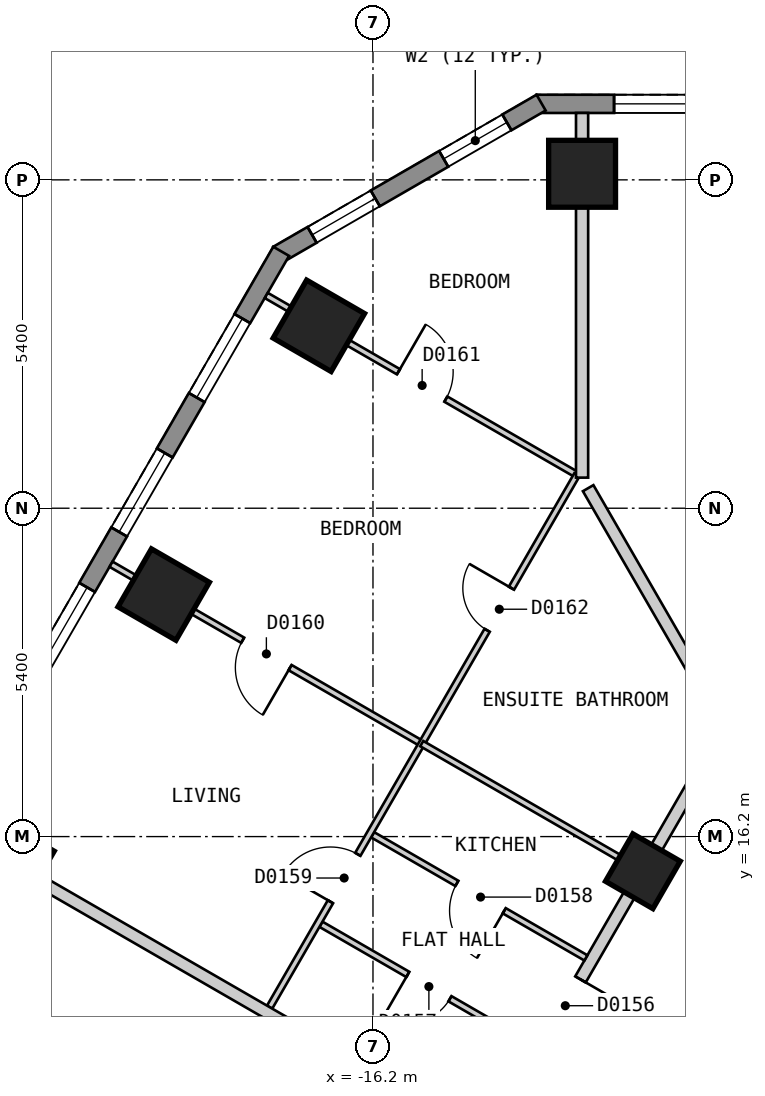
"""IFC4 building model, lengths in metres.
Left out: names, types, materials, properties, quantities, classifications, styles, units other than length and angle.
Written with IfcOpenShell. Run it as: python <this file> out.ifc"""

import sys

from ifc_helpers import new_model, si_unit, direction, frame, frame_2d, origin, origin_2d, place, context, subcontext, project, spatial, polyline, rectangle, outline, extrude, element, fill, save


model = new_model("IFC4")
c1 = context("Model", 3, precision=1e-05, world=origin(), true_north=direction((0.0, 1.0)))
c2 = subcontext(c1, "Body", "Model", "MODEL_VIEW")
j1 = project(units=[si_unit("LENGTHUNIT", "METRE"), si_unit("PLANEANGLEUNIT", "RADIAN")], contexts=[c1])
p1 = place(None, origin())
s1 = spatial("IfcSite", under=j1, at=p1, CompositionType="ELEMENT")
p2 = place(p1, origin())
s2 = spatial("IfcBuilding", under=s1, at=p2, CompositionType="ELEMENT")
p3 = place(p2, frame((0.0, 0.0, 29.4)))
s3 = spatial("IfcBuildingStorey", under=s2, at=p3, CompositionType="ELEMENT", Elevation=29.4)
for number, where, z_axis, x_axis in (
    (1, (-12.761, 27.1, 0.0), (0.0, 0.0, 1.0), (-1.0, 0.0, 0.0)),
    (2, (-17.09, 24.6, 0.0), (0.0, 0.0, 1.0), (-0.5, -0.866, 0.0)),
    (3, (-19.642, 20.18, 0.0), (0.0, 0.0, 1.0), (-0.5, -0.866, 0.0)),
    (4, (-22.194, 15.759, 0.0), (0.0, 0.0, 1.0), (-0.5, -0.866, 0.0)),
):
    element("IfcColumn", number, at=place(p3, frame(where, z_axis=z_axis, x_axis=x_axis)), inside=s3, PredefinedType="COLUMN", context=c2, shape_type="SweptSolid", body=[
        extrude(rectangle(XDim=1.1, YDim=1.1, at=origin_2d()), origin(), (0.0, 0.0, 1.0), 3.0),
    ])
p4 = place(p3, frame((-11.761, 15.63, 0.0), z_axis=(0.0, 0.0, 1.0), x_axis=(-0.499984884929, -0.866034130299, 0.0)))
e5 = element("IfcColumn", 5, at=p4, inside=s3, PredefinedType="COLUMN", context=c2, shape_type="SweptSolid", body=[
    extrude(rectangle(XDim=0.9, YDim=0.9, at=origin_2d()), origin(), (0.0, 0.0, 1.0), 3.0),
])
p5 = place(p3, frame((13.51, 28.25, 0.0), z_axis=(0.0, 0.0, 1.0), x_axis=(-1.0, 0.0, 0.0)))
e6 = element("IfcWall", 6, at=p5, inside=s3, PredefinedType="SOLIDWALL", context=c2, shape_type="SweptSolid", body=[
    extrude(outline(polyline([(0.0, -0.15), (27.02, -0.15), (26.94, 0.15), (0.08, 0.15), (0.0, -0.15)])), origin(), (0.0, 0.0, 1.0), 2.7),
])
p6 = place(p5, frame((1.277, 0.0, 0.15)))
e7 = element("IfcOpeningElement", 7, at=p6, cuts=e6, PredefinedType="OPENING", context=c2, shape_type="SweptSolid", body=[
    extrude(rectangle(XDim=1.5, YDim=2.1, at=frame_2d((0.75, 1.05))), frame((0.0, 0.16, 0.0), z_axis=(0.0, -1.0, 0.0), x_axis=(1.0, 0.0, 0.0)), (0.0, 0.0, 1.0), 0.32),
])
p7 = place(p5, frame((3.829, 0.0, 0.15)))
e8 = element("IfcOpeningElement", 8, at=p7, cuts=e6, PredefinedType="OPENING", context=c2, shape_type="SweptSolid", body=[
    extrude(rectangle(XDim=1.5, YDim=2.1, at=frame_2d((0.75, 1.05))), frame((0.0, 0.16, 0.0), z_axis=(0.0, -1.0, 0.0), x_axis=(1.0, 0.0, 0.0)), (0.0, 0.0, 1.0), 0.32),
])
p8 = place(p5, frame((6.381, 0.0, 0.15)))
e9 = element("IfcOpeningElement", 9, at=p8, cuts=e6, PredefinedType="OPENING", context=c2, shape_type="SweptSolid", body=[
    extrude(rectangle(XDim=1.5, YDim=2.1, at=frame_2d((0.75, 1.05))), frame((0.0, 0.16, 0.0), z_axis=(0.0, -1.0, 0.0), x_axis=(1.0, 0.0, 0.0)), (0.0, 0.0, 1.0), 0.32),
])
p9 = place(p5, frame((8.933, 0.0, 0.15)))
e10 = element("IfcOpeningElement", 10, at=p9, cuts=e6, PredefinedType="OPENING", context=c2, shape_type="SweptSolid", body=[
    extrude(rectangle(XDim=1.5, YDim=2.1, at=frame_2d((0.75, 1.05))), frame((0.0, 0.16, 0.0), z_axis=(0.0, -1.0, 0.0), x_axis=(1.0, 0.0, 0.0)), (0.0, 0.0, 1.0), 0.32),
])
p10 = place(p5, frame((11.485, 0.0, 0.15)))
e11 = element("IfcOpeningElement", 11, at=p10, cuts=e6, PredefinedType="OPENING", context=c2, shape_type="SweptSolid", body=[
    extrude(rectangle(XDim=1.5, YDim=2.1, at=frame_2d((0.75, 1.05))), frame((0.0, 0.16, 0.0), z_axis=(0.0, -1.0, 0.0), x_axis=(1.0, 0.0, 0.0)), (0.0, 0.0, 1.0), 0.32),
])
p11 = place(p5, frame((14.037, 0.0, 0.15)))
e12 = element("IfcOpeningElement", 12, at=p11, cuts=e6, PredefinedType="OPENING", context=c2, shape_type="SweptSolid", body=[
    extrude(rectangle(XDim=1.5, YDim=2.1, at=frame_2d((0.75, 1.05))), frame((0.0, 0.16, 0.0), z_axis=(0.0, -1.0, 0.0), x_axis=(1.0, 0.0, 0.0)), (0.0, 0.0, 1.0), 0.32),
])
p12 = place(p5, frame((16.589, 0.0, 0.15)))
e13 = element("IfcOpeningElement", 13, at=p12, cuts=e6, PredefinedType="OPENING", context=c2, shape_type="SweptSolid", body=[
    extrude(rectangle(XDim=1.5, YDim=2.1, at=frame_2d((0.75, 1.05))), frame((0.0, 0.16, 0.0), z_axis=(0.0, -1.0, 0.0), x_axis=(1.0, 0.0, 0.0)), (0.0, 0.0, 1.0), 0.32),
])
p13 = place(p5, frame((19.141, 0.0, 0.15)))
e14 = element("IfcOpeningElement", 14, at=p13, cuts=e6, PredefinedType="OPENING", context=c2, shape_type="SweptSolid", body=[
    extrude(rectangle(XDim=1.5, YDim=2.1, at=frame_2d((0.75, 1.05))), frame((0.0, 0.16, 0.0), z_axis=(0.0, -1.0, 0.0), x_axis=(1.0, 0.0, 0.0)), (0.0, 0.0, 1.0), 0.32),
])
p14 = place(p5, frame((21.693, 0.0, 0.15)))
e15 = element("IfcOpeningElement", 15, at=p14, cuts=e6, PredefinedType="OPENING", context=c2, shape_type="SweptSolid", body=[
    extrude(rectangle(XDim=1.5, YDim=2.1, at=frame_2d((0.75, 1.05))), frame((0.0, 0.16, 0.0), z_axis=(0.0, -1.0, 0.0), x_axis=(1.0, 0.0, 0.0)), (0.0, 0.0, 1.0), 0.32),
])
p15 = place(p5, frame((24.245, 0.0, 0.15)))
e16 = element("IfcOpeningElement", 16, at=p15, cuts=e6, PredefinedType="OPENING", context=c2, shape_type="SweptSolid", body=[
    extrude(rectangle(XDim=1.5, YDim=2.1, at=frame_2d((0.75, 1.05))), frame((0.0, 0.16, 0.0), z_axis=(0.0, -1.0, 0.0), x_axis=(1.0, 0.0, 0.0)), (0.0, 0.0, 1.0), 0.32),
])
p16 = place(p3, frame((-13.435, 28.27, 0.0), z_axis=(0.0, 0.0, 1.0), x_axis=(-0.866010750942, -0.50002537861, 0.0)))
e17 = element("IfcWall", 17, at=p16, inside=s3, PredefinedType="SOLIDWALL", context=c2, shape_type="SweptSolid", body=[
    extrude(outline(polyline([(0.0, -0.15), (5.0, -0.15), (4.919, 0.15), (0.08, 0.15), (0.0, -0.15)])), origin(), (0.0, 0.0, 1.0), 2.7),
])
p17 = place(p16, frame((0.65, 0.0, 0.15)))
e18 = element("IfcOpeningElement", 18, at=p17, cuts=e17, PredefinedType="OPENING", context=c2, shape_type="SweptSolid", body=[
    extrude(rectangle(XDim=1.2, YDim=2.1, at=frame_2d((0.6, 1.05))), frame((0.0, 0.16, 0.0), z_axis=(0.0, -1.0, 0.0), x_axis=(1.0, 0.0, 0.0)), (0.0, 0.0, 1.0), 0.32),
])
p18 = place(p16, frame((3.149, 0.0, 0.15)))
e19 = element("IfcOpeningElement", 19, at=p18, cuts=e17, PredefinedType="OPENING", context=c2, shape_type="SweptSolid", body=[
    extrude(rectangle(XDim=1.2, YDim=2.1, at=frame_2d((0.6, 1.05))), frame((0.0, 0.16, 0.0), z_axis=(0.0, -1.0, 0.0), x_axis=(1.0, 0.0, 0.0)), (0.0, 0.0, 1.0), 0.32),
])
p19 = place(p3, frame((-17.71, 25.825, 0.0), z_axis=(0.0, 0.0, 1.0), x_axis=(-0.500001938803, -0.866024284413, 0.0)))
e20 = element("IfcWall", 20, at=p19, inside=s3, PredefinedType="SOLIDWALL", context=c2, shape_type="SweptSolid", body=[
    extrude(outline(polyline([(0.0, -0.15), (27.02, -0.15), (26.94, 0.15), (0.08, 0.15), (0.0, -0.15)])), origin(), (0.0, 0.0, 1.0), 2.7),
])
p20 = place(p19, frame((1.277, 0.0, 0.15)))
e21 = element("IfcOpeningElement", 21, at=p20, cuts=e20, PredefinedType="OPENING", context=c2, shape_type="SweptSolid", body=[
    extrude(rectangle(XDim=1.5, YDim=2.1, at=frame_2d((0.75, 1.05))), frame((0.0, 0.16, 0.0), z_axis=(0.0, -1.0, 0.0), x_axis=(1.0, 0.0, 0.0)), (0.0, 0.0, 1.0), 0.32),
])
p21 = place(p19, frame((3.829, 0.0, 0.15)))
e22 = element("IfcOpeningElement", 22, at=p21, cuts=e20, PredefinedType="OPENING", context=c2, shape_type="SweptSolid", body=[
    extrude(rectangle(XDim=1.5, YDim=2.1, at=frame_2d((0.75, 1.05))), frame((0.0, 0.16, 0.0), z_axis=(0.0, -1.0, 0.0), x_axis=(1.0, 0.0, 0.0)), (0.0, 0.0, 1.0), 0.32),
])
p22 = place(p19, frame((6.382, 0.0, 0.15)))
e23 = element("IfcOpeningElement", 23, at=p22, cuts=e20, PredefinedType="OPENING", context=c2, shape_type="SweptSolid", body=[
    extrude(rectangle(XDim=1.5, YDim=2.1, at=frame_2d((0.75, 1.05))), frame((0.0, 0.16, 0.0), z_axis=(0.0, -1.0, 0.0), x_axis=(1.0, 0.0, 0.0)), (0.0, 0.0, 1.0), 0.32),
])
p23 = place(p19, frame((8.933, 0.0, 0.15)))
e24 = element("IfcOpeningElement", 24, at=p23, cuts=e20, PredefinedType="OPENING", context=c2, shape_type="SweptSolid", body=[
    extrude(rectangle(XDim=1.5, YDim=2.1, at=frame_2d((0.75, 1.05))), frame((0.0, 0.16, 0.0), z_axis=(0.0, -1.0, 0.0), x_axis=(1.0, 0.0, 0.0)), (0.0, 0.0, 1.0), 0.32),
])
p24 = place(p19, frame((11.485, 0.0, 0.15)))
e25 = element("IfcOpeningElement", 25, at=p24, cuts=e20, PredefinedType="OPENING", context=c2, shape_type="SweptSolid", body=[
    extrude(rectangle(XDim=1.5, YDim=2.1, at=frame_2d((0.75, 1.05))), frame((0.0, 0.16, 0.0), z_axis=(0.0, -1.0, 0.0), x_axis=(1.0, 0.0, 0.0)), (0.0, 0.0, 1.0), 0.32),
])
p25 = place(p19, frame((14.037, 0.0, 0.15)))
e26 = element("IfcOpeningElement", 26, at=p25, cuts=e20, PredefinedType="OPENING", context=c2, shape_type="SweptSolid", body=[
    extrude(rectangle(XDim=1.5, YDim=2.1, at=frame_2d((0.75, 1.05))), frame((0.0, 0.16, 0.0), z_axis=(0.0, -1.0, 0.0), x_axis=(1.0, 0.0, 0.0)), (0.0, 0.0, 1.0), 0.32),
])
p26 = place(p19, frame((16.589, 0.0, 0.15)))
e27 = element("IfcOpeningElement", 27, at=p26, cuts=e20, PredefinedType="OPENING", context=c2, shape_type="SweptSolid", body=[
    extrude(rectangle(XDim=1.5, YDim=2.1, at=frame_2d((0.75, 1.05))), frame((0.0, 0.16, 0.0), z_axis=(0.0, -1.0, 0.0), x_axis=(1.0, 0.0, 0.0)), (0.0, 0.0, 1.0), 0.32),
])
p27 = place(p19, frame((19.141, 0.0, 0.15)))
e28 = element("IfcOpeningElement", 28, at=p27, cuts=e20, PredefinedType="OPENING", context=c2, shape_type="SweptSolid", body=[
    extrude(rectangle(XDim=1.5, YDim=2.1, at=frame_2d((0.75, 1.05))), frame((0.0, 0.16, 0.0), z_axis=(0.0, -1.0, 0.0), x_axis=(1.0, 0.0, 0.0)), (0.0, 0.0, 1.0), 0.32),
])
p28 = place(p19, frame((21.693, 0.0, 0.15)))
e29 = element("IfcOpeningElement", 29, at=p28, cuts=e20, PredefinedType="OPENING", context=c2, shape_type="SweptSolid", body=[
    extrude(rectangle(XDim=1.5, YDim=2.1, at=frame_2d((0.75, 1.05))), frame((0.0, 0.16, 0.0), z_axis=(0.0, -1.0, 0.0), x_axis=(1.0, 0.0, 0.0)), (0.0, 0.0, 1.0), 0.32),
])
p29 = place(p19, frame((24.244, 0.0, 0.15)))
e30 = element("IfcOpeningElement", 30, at=p29, cuts=e20, PredefinedType="OPENING", context=c2, shape_type="SweptSolid", body=[
    extrude(rectangle(XDim=1.5, YDim=2.1, at=frame_2d((0.75, 1.05))), frame((0.0, 0.16, 0.0), z_axis=(0.0, -1.0, 0.0), x_axis=(1.0, 0.0, 0.0)), (0.0, 0.0, 1.0), 0.32),
])
p30 = place(p3, frame((-18.244, -0.001, 0.0), z_axis=(0.0, 0.0, 1.0), x_axis=(0.499962999376, 0.866046765051, 0.0)))
e31 = element("IfcWall", 31, at=p30, inside=s3, PredefinedType="PARTITIONING", context=c2, shape_type="SweptSolid", body=[
    extrude(rectangle(XDim=18.245, YDim=0.2, at=frame_2d((9.123, 0.0))), origin(), (0.0, 0.0, 1.0), 2.7),
])
p31 = place(p30, frame((8.672, 0.0, 0.0)))
e32 = element("IfcOpeningElement", 32, at=p31, cuts=e31, PredefinedType="OPENING", context=c2, shape_type="SweptSolid", body=[
    extrude(rectangle(XDim=0.9, YDim=2.1, at=frame_2d((0.45, 1.05))), frame((0.0, 0.11, 0.0), z_axis=(0.0, -1.0, 0.0), x_axis=(1.0, 0.0, 0.0)), (0.0, 0.0, 1.0), 0.22),
])
p32 = place(p3, frame((-20.727, 0.099, 0.0), z_axis=(0.0, 0.0, 1.0), x_axis=(0.499993204491, 0.866029327138, 0.0)))
e33 = element("IfcWall", 33, at=p32, inside=s3, PredefinedType="PARTITIONING", context=c2, shape_type="SweptSolid", body=[
    extrude(rectangle(XDim=20.554, YDim=0.2, at=frame_2d((10.277, 0.0))), origin(), (0.0, 0.0, 1.0), 2.7),
])
p33 = place(p32, frame((14.88, 0.0, 0.0)))
e34 = element("IfcOpeningElement", 34, at=p33, cuts=e33, PredefinedType="OPENING", context=c2, shape_type="SweptSolid", body=[
    extrude(rectangle(XDim=1.0, YDim=2.1, at=frame_2d((0.5, 1.05))), frame((0.0, 0.11, 0.0), z_axis=(0.0, -1.0, 0.0), x_axis=(1.0, 0.0, 0.0)), (0.0, 0.0, 1.0), 0.22),
])
p34 = place(p32, frame((4.673, 0.0, 0.0)))
e35 = element("IfcOpeningElement", 35, at=p34, cuts=e33, PredefinedType="OPENING", context=c2, shape_type="SweptSolid", body=[
    extrude(rectangle(XDim=1.0, YDim=2.1, at=frame_2d((0.5, 1.05))), frame((0.0, 0.11, 0.0), z_axis=(0.0, -1.0, 0.0), x_axis=(1.0, 0.0, 0.0)), (0.0, 0.0, 1.0), 0.22),
])
p35 = place(p3, frame((-17.056, 14.758, 0.0), z_axis=(0.0, 0.0, 1.0), x_axis=(0.866035025835, -0.499983333749, 0.0)))
e36 = element("IfcWall", 36, at=p35, inside=s3, PredefinedType="PARTITIONING", context=c2, shape_type="SweptSolid", body=[
    extrude(rectangle(XDim=4.051, YDim=0.1, at=frame_2d((2.025, 0.0))), origin(), (0.0, 0.0, 1.0), 2.7),
])
p36 = place(p35, frame((1.65, 0.0, 0.0)))
e37 = element("IfcOpeningElement", 37, at=p36, cuts=e36, PredefinedType="OPENING", context=c2, shape_type="SweptSolid", body=[
    extrude(rectangle(XDim=0.8, YDim=2.1, at=frame_2d((0.4, 1.05))), frame((0.0, 0.06, 0.0), z_axis=(0.0, -1.0, 0.0), x_axis=(1.0, 0.0, 0.0)), (0.0, 0.0, 1.0), 0.12),
])
p37 = place(p3, frame((-16.206, 16.23, 0.0), z_axis=(0.0, 0.0, 1.0), x_axis=(0.866076189179, -0.499912026797, 0.0)))
e38 = element("IfcWall", 38, at=p37, inside=s3, PredefinedType="PARTITIONING", context=c2, shape_type="SweptSolid", body=[
    extrude(rectangle(XDim=4.051, YDim=0.1, at=frame_2d((2.025, 0.0))), origin(), (0.0, 0.0, 1.0), 2.7),
])
p38 = place(p37, frame((1.6, 0.0, 0.0)))
e39 = element("IfcOpeningElement", 39, at=p38, cuts=e38, PredefinedType="OPENING", context=c2, shape_type="SweptSolid", body=[
    extrude(rectangle(XDim=0.9, YDim=2.1, at=frame_2d((0.45, 1.05))), frame((0.0, 0.06, 0.0), z_axis=(0.0, -1.0, 0.0), x_axis=(1.0, 0.0, 0.0)), (0.0, 0.0, 1.0), 0.12),
])
p39 = place(p3, frame((-20.508, 20.679, 0.0), z_axis=(0.0, 0.0, 1.0), x_axis=(0.866052608538, -0.499952877023, 0.0)))
e40 = element("IfcWall", 40, at=p39, inside=s3, PredefinedType="PARTITIONING", context=c2, shape_type="SweptSolid", body=[
    extrude(rectangle(XDim=5.9, YDim=0.1, at=frame_2d((2.95, 0.0))), origin(), (0.0, 0.0, 1.0), 2.7),
])
p40 = place(p39, frame((2.5, 0.0, 0.0)))
e41 = element("IfcOpeningElement", 41, at=p40, cuts=e40, PredefinedType="OPENING", context=c2, shape_type="SweptSolid", body=[
    extrude(rectangle(XDim=0.9, YDim=2.1, at=frame_2d((0.45, 1.05))), frame((0.0, 0.06, 0.0), z_axis=(0.0, -1.0, 0.0), x_axis=(1.0, 0.0, 0.0)), (0.0, 0.0, 1.0), 0.12),
])
p41 = place(p3, frame((-17.955, 25.099, 0.0), z_axis=(0.0, 0.0, 1.0), x_axis=(0.866069217599, -0.499924104568, 0.0)))
e42 = element("IfcWall", 42, at=p41, inside=s3, PredefinedType="PARTITIONING", context=c2, shape_type="SweptSolid", body=[
    extrude(rectangle(XDim=5.869, YDim=0.1, at=frame_2d((2.935, 0.0))), origin(), (0.0, 0.0, 1.0), 2.7),
])
p42 = place(p41, frame((2.51, 0.0, 0.0)))
e43 = element("IfcOpeningElement", 43, at=p42, cuts=e42, PredefinedType="OPENING", context=c2, shape_type="SweptSolid", body=[
    extrude(rectangle(XDim=0.9, YDim=2.1, at=frame_2d((0.45, 1.05))), frame((0.0, 0.06, 0.0), z_axis=(0.0, -1.0, 0.0), x_axis=(1.0, 0.0, 0.0)), (0.0, 0.0, 1.0), 0.12),
])
p43 = place(p3, frame((-17.9, 13.395, 0.0), z_axis=(0.0, 0.0, 1.0), x_axis=(0.499949632511, 0.866054481515, 0.0)))
e44 = element("IfcWall", 44, at=p43, inside=s3, PredefinedType="PARTITIONING", context=c2, shape_type="SweptSolid", body=[
    extrude(rectangle(XDim=10.109, YDim=0.1, at=frame_2d((5.054, 0.0))), origin(), (0.0, 0.0, 1.0), 2.7),
])
p44 = place(p43, frame((2.002, 0.0, 0.0)))
e45 = element("IfcOpeningElement", 45, at=p44, cuts=e44, PredefinedType="OPENING", context=c2, shape_type="SweptSolid", body=[
    extrude(rectangle(XDim=0.9, YDim=2.1, at=frame_2d((0.45, 1.05))), frame((0.0, 0.06, 0.0), z_axis=(0.0, -1.0, 0.0), x_axis=(1.0, 0.0, 0.0)), (0.0, 0.0, 1.0), 0.12),
])
p45 = place(p43, frame((7.156, 0.0, 0.0)))
e46 = element("IfcOpeningElement", 46, at=p45, cuts=e44, PredefinedType="OPENING", context=c2, shape_type="SweptSolid", body=[
    extrude(rectangle(XDim=0.8, YDim=2.1, at=frame_2d((0.4, 1.05))), frame((0.0, 0.06, 0.0), z_axis=(0.0, -1.0, 0.0), x_axis=(1.0, 0.0, 0.0)), (0.0, 0.0, 1.0), 0.12),
])
p46 = place(p3, frame((-12.661, 21.93, 0.0), z_axis=(0.0, 0.0, 1.0), x_axis=(0.499975495332, -0.866039551099, 0.0)))
e47 = element("IfcWall", 47, at=p46, inside=s3, PredefinedType="PARTITIONING", context=c2, shape_type="SweptSolid", body=[
    extrude(rectangle(XDim=4.538, YDim=0.2, at=frame_2d((2.269, 0.0))), origin(), (0.0, 0.0, 1.0), 2.7),
])
p47 = place(p3, frame((-23.06, 16.259, 0.0), z_axis=(0.0, 0.0, 1.0), x_axis=(0.866047370643, -0.499961950354, 0.0)))
e48 = element("IfcWall", 48, at=p47, inside=s3, PredefinedType="PARTITIONING", context=c2, shape_type="SweptSolid", body=[
    extrude(rectangle(XDim=10.001, YDim=0.2, at=frame_2d((5.0, 0.0))), origin(), (0.0, 0.0, 1.0), 2.7),
])
p48 = place(p3, frame((-12.761, 22.103, 0.0), z_axis=(0.0, 0.0, 1.0), x_axis=(0.0, 1.0, 0.0)))
e49 = element("IfcWall", 49, at=p48, inside=s3, PredefinedType="PARTITIONING", context=c2, shape_type="SweptSolid", body=[
    extrude(rectangle(XDim=5.997, YDim=0.2, at=frame_2d((2.999, 0.0))), origin(), (0.0, 0.0, 1.0), 2.7),
])
p49 = place(p3, frame((-15.398, 17.729, 0.0), z_axis=(0.0, 0.0, 1.0), x_axis=(0.866039832988, -0.499975007054, 0.0)))
e50 = element("IfcWall", 50, at=p49, inside=s3, PredefinedType="PARTITIONING", context=c2, shape_type="SweptSolid", body=[
    extrude(rectangle(XDim=4.1, YDim=0.1, at=frame_2d((2.05, 0.0))), origin(), (0.0, 0.0, 1.0), 2.7),
])
p50 = place(p15, origin())
e51 = element("IfcWindow", 51, at=p50, inside=s3, PartitioningType="SINGLE_PANEL", PredefinedType="WINDOW", context=c2, shape_type="SweptSolid", body=[
    extrude(rectangle(XDim=1.5, YDim=2.1, at=frame_2d((0.75, 1.05))), frame((0.0, 0.03, 0.0), z_axis=(0.0, -1.0, 0.0), x_axis=(1.0, 0.0, 0.0)), (0.0, 0.0, 1.0), 0.06),
])
fill(e16, e51)
p51 = place(p17, origin())
e52 = element("IfcWindow", 52, at=p51, inside=s3, PartitioningType="SINGLE_PANEL", PredefinedType="WINDOW", context=c2, shape_type="SweptSolid", body=[
    extrude(rectangle(XDim=1.2, YDim=2.1, at=frame_2d((0.6, 1.05))), frame((0.0, 0.03, 0.0), z_axis=(0.0, -1.0, 0.0), x_axis=(1.0, 0.0, 0.0)), (0.0, 0.0, 1.0), 0.06),
])
fill(e18, e52)
p52 = place(p18, origin())
e53 = element("IfcWindow", 53, at=p52, inside=s3, PartitioningType="SINGLE_PANEL", PredefinedType="WINDOW", context=c2, shape_type="SweptSolid", body=[
    extrude(rectangle(XDim=1.2, YDim=2.1, at=frame_2d((0.6, 1.05))), frame((0.0, 0.03, 0.0), z_axis=(0.0, -1.0, 0.0), x_axis=(1.0, 0.0, 0.0)), (0.0, 0.0, 1.0), 0.06),
])
fill(e19, e53)
p53 = place(p20, origin())
e54 = element("IfcWindow", 54, at=p53, inside=s3, PartitioningType="SINGLE_PANEL", PredefinedType="WINDOW", context=c2, shape_type="SweptSolid", body=[
    extrude(rectangle(XDim=1.5, YDim=2.1, at=frame_2d((0.75, 1.05))), frame((0.0, 0.03, 0.0), z_axis=(0.0, -1.0, 0.0), x_axis=(1.0, 0.0, 0.0)), (0.0, 0.0, 1.0), 0.06),
])
fill(e21, e54)
p54 = place(p21, origin())
e55 = element("IfcWindow", 55, at=p54, inside=s3, PartitioningType="SINGLE_PANEL", PredefinedType="WINDOW", context=c2, shape_type="SweptSolid", body=[
    extrude(rectangle(XDim=1.5, YDim=2.1, at=frame_2d((0.75, 1.05))), frame((0.0, 0.03, 0.0), z_axis=(0.0, -1.0, 0.0), x_axis=(1.0, 0.0, 0.0)), (0.0, 0.0, 1.0), 0.06),
])
fill(e22, e55)
p55 = place(p22, origin())
e56 = element("IfcWindow", 56, at=p55, inside=s3, PartitioningType="SINGLE_PANEL", PredefinedType="WINDOW", context=c2, shape_type="SweptSolid", body=[
    extrude(rectangle(XDim=1.5, YDim=2.1, at=frame_2d((0.75, 1.05))), frame((0.0, 0.03, 0.0), z_axis=(0.0, -1.0, 0.0), x_axis=(1.0, 0.0, 0.0)), (0.0, 0.0, 1.0), 0.06),
])
fill(e23, e56)
p56 = place(p33, origin())
e57 = element("IfcDoor", 57, at=p56, inside=s3, OperationType="SINGLE_SWING_RIGHT", PredefinedType="DOOR", context=c2, shape_type="SweptSolid", body=[
    extrude(rectangle(XDim=1.0, YDim=2.1, at=frame_2d((0.5, 1.05))), frame((0.0, 0.025, 0.0), z_axis=(0.0, -1.0, 0.0), x_axis=(1.0, 0.0, 0.0)), (0.0, 0.0, 1.0), 0.05),
])
fill(e34, e57)
p57 = place(p36, origin())
e58 = element("IfcDoor", 58, at=p57, inside=s3, OperationType="SINGLE_SWING_LEFT", PredefinedType="DOOR", context=c2, shape_type="SweptSolid", body=[
    extrude(rectangle(XDim=0.8, YDim=2.1, at=frame_2d((0.4, 1.05))), frame((0.0, 0.025, 0.0), z_axis=(0.0, -1.0, 0.0), x_axis=(1.0, 0.0, 0.0)), (0.0, 0.0, 1.0), 0.05),
])
fill(e37, e58)
p58 = place(p38, origin())
e59 = element("IfcDoor", 59, at=p58, inside=s3, OperationType="SINGLE_SWING_RIGHT", PredefinedType="DOOR", context=c2, shape_type="SweptSolid", body=[
    extrude(rectangle(XDim=0.9, YDim=2.1, at=frame_2d((0.45, 1.05))), frame((0.0, 0.025, 0.0), z_axis=(0.0, -1.0, 0.0), x_axis=(1.0, 0.0, 0.0)), (0.0, 0.0, 1.0), 0.05),
])
fill(e39, e59)
p59 = place(p44, origin())
e60 = element("IfcDoor", 60, at=p59, inside=s3, OperationType="SINGLE_SWING_LEFT", PredefinedType="DOOR", context=c2, shape_type="SweptSolid", body=[
    extrude(rectangle(XDim=0.9, YDim=2.1, at=frame_2d((0.45, 1.05))), frame((0.0, 0.025, 0.0), z_axis=(0.0, -1.0, 0.0), x_axis=(1.0, 0.0, 0.0)), (0.0, 0.0, 1.0), 0.05),
])
fill(e45, e60)
p60 = place(p40, origin())
e61 = element("IfcDoor", 61, at=p60, inside=s3, OperationType="SINGLE_SWING_RIGHT", PredefinedType="DOOR", context=c2, shape_type="SweptSolid", body=[
    extrude(rectangle(XDim=0.9, YDim=2.1, at=frame_2d((0.45, 1.05))), frame((0.0, 0.025, 0.0), z_axis=(0.0, -1.0, 0.0), x_axis=(1.0, 0.0, 0.0)), (0.0, 0.0, 1.0), 0.05),
])
fill(e41, e61)
p61 = place(p42, origin())
e62 = element("IfcDoor", 62, at=p61, inside=s3, OperationType="SINGLE_SWING_LEFT", PredefinedType="DOOR", context=c2, shape_type="SweptSolid", body=[
    extrude(rectangle(XDim=0.9, YDim=2.1, at=frame_2d((0.45, 1.05))), frame((0.0, 0.025, 0.0), z_axis=(0.0, -1.0, 0.0), x_axis=(1.0, 0.0, 0.0)), (0.0, 0.0, 1.0), 0.05),
])
fill(e43, e62)
p62 = place(p45, origin())
e63 = element("IfcDoor", 63, at=p62, inside=s3, OperationType="SINGLE_SWING_RIGHT", PredefinedType="DOOR", context=c2, shape_type="SweptSolid", body=[
    extrude(rectangle(XDim=0.8, YDim=2.1, at=frame_2d((0.4, 1.05))), frame((0.0, 0.025, 0.0), z_axis=(0.0, -1.0, 0.0), x_axis=(1.0, 0.0, 0.0)), (0.0, 0.0, 1.0), 0.05),
])
fill(e46, e63)
save(model, sys.argv[1])
